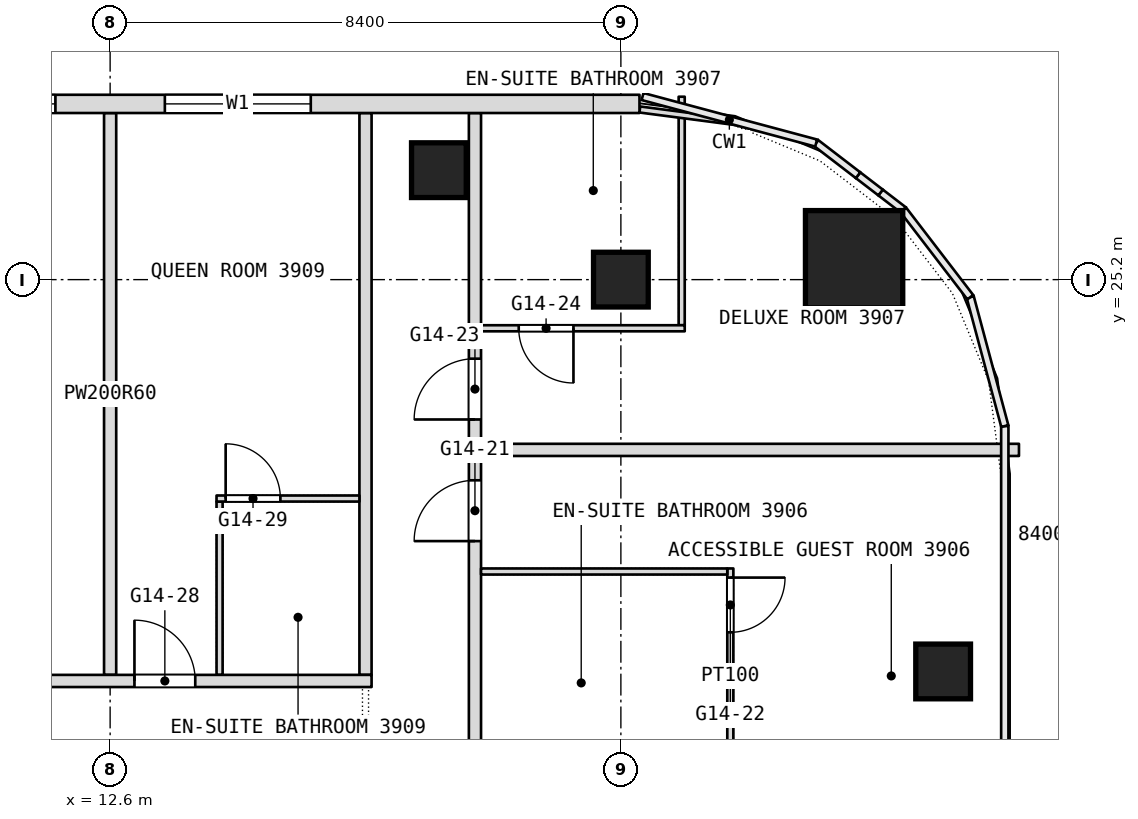
"""IFC4 building model, lengths in metres.
Left out: names, types, materials, properties, quantities, classifications, styles, units other than length and angle.
Written with IfcOpenShell. Run it as: python <this file> out.ifc"""

import sys

from ifc_helpers import new_model, si_unit, direction, frame, frame_2d, origin, origin_2d, place, context, subcontext, project, spatial, rectangle, extrude, element, fill, save


model = new_model("IFC4")
c1 = context("Model", 3, precision=1e-05, world=origin(), true_north=direction((0.0, 1.0)))
c2 = subcontext(c1, "Body", "Model", "MODEL_VIEW")
j1 = project(units=[si_unit("LENGTHUNIT", "METRE"), si_unit("PLANEANGLEUNIT", "RADIAN")], contexts=[c1])
p1 = place(None, origin())
s1 = spatial("IfcSite", under=j1, at=p1, CompositionType="ELEMENT")
p2 = place(p1, origin())
s2 = spatial("IfcBuilding", under=s1, at=p2, CompositionType="ELEMENT")
p3 = place(p2, frame((0.0, 0.0, 166.1)))
s3 = spatial("IfcBuildingStorey", under=s2, at=p3, CompositionType="ELEMENT", Elevation=166.1)
p4 = place(p3, frame((24.835, 25.535, 0.0), z_axis=(0.0, 0.0, 1.0), x_axis=(1.0, 0.0, 0.0)))
e1 = element("IfcColumn", 1, at=p4, inside=s3, PredefinedType="COLUMN", context=c2, shape_type="SweptSolid", body=[
    extrude(rectangle(XDim=1.6, YDim=1.6, at=origin_2d()), origin(), (0.0, 0.0, 1.0), 3.6),
])
for number, where, z_axis, x_axis in (
    (2, (21.0, 25.2, 0.0), (0.0, 0.0, 1.0), (1.0, 0.0, 0.0)),
    (3, (18.007, 27.0, 0.0), (0.0, 0.0, 1.0), (1.0, 0.0, 0.0)),
    (4, (26.3, 18.756, 0.0), (0.0, 0.0, 1.0), (1.0, 0.0, 0.0)),
):
    element("IfcColumn", number, at=place(p3, frame(where, z_axis=z_axis, x_axis=x_axis)), inside=s3, PredefinedType="COLUMN", context=c2, shape_type="SweptSolid", body=[
        extrude(rectangle(XDim=0.9, YDim=0.9, at=origin_2d()), origin(), (0.0, 0.0, 1.0), 3.6),
    ])
p5 = place(p3, frame((22.8, 16.9, 0.0), z_axis=(0.0, 0.0, 1.0), x_axis=(0.0, 1.0, 0.0)))
e5 = element("IfcWall", 5, at=p5, inside=s3, PredefinedType="PARTITIONING", context=c2, shape_type="SweptSolid", body=[
    extrude(rectangle(XDim=3.55, YDim=0.1, at=frame_2d((1.775, 0.0))), origin(), (0.0, 0.0, 1.0), 3.3),
])
p6 = place(p5, frame((2.5, 0.0, 0.0)))
e6 = element("IfcOpeningElement", 6, at=p6, cuts=e5, PredefinedType="OPENING", context=c2, shape_type="SweptSolid", body=[
    extrude(rectangle(XDim=0.9, YDim=2.1, at=frame_2d((0.45, 1.05))), frame((0.0, 0.05, 0.0), z_axis=(0.0, -1.0, 0.0), x_axis=(1.0, 0.0, 0.0)), (0.0, 0.0, 1.0), 0.1),
])
p7 = place(p3, frame((22.0, 24.45, 0.0), z_axis=(0.0, 0.0, 1.0), x_axis=(0.0, 1.0, 0.0)))
e7 = element("IfcWall", 7, at=p7, inside=s3, PredefinedType="PARTITIONING", context=c2, shape_type="SweptSolid", body=[
    extrude(rectangle(XDim=3.758, YDim=0.1, at=frame_2d((1.879, 0.0))), origin(), (0.0, 0.0, 1.0), 3.3),
])
p8 = place(p3, frame((18.6, -21.708, 0.0), z_axis=(0.0, 0.0, 1.0), x_axis=(0.0, 1.0, 0.0)))
e8 = element("IfcWall", 8, at=p8, inside=s3, PredefinedType="PARTITIONING", context=c2, shape_type="SweptSolid", body=[
    extrude(rectangle(XDim=49.648, YDim=0.2, at=frame_2d((24.824, 0.0))), origin(), (0.0, 0.0, 1.0), 3.3),
])
p9 = place(p8, frame((2.204, 0.0, 0.0)))
e9 = element("IfcOpeningElement", 9, at=p9, cuts=e8, PredefinedType="OPENING", context=c2, shape_type="SweptSolid", body=[
    extrude(rectangle(XDim=0.9, YDim=2.1, at=frame_2d((0.45, 1.05))), frame((0.0, 0.1, 0.0), z_axis=(0.0, -1.0, 0.0), x_axis=(1.0, 0.0, 0.0)), (0.0, 0.0, 1.0), 0.2),
])
p10 = place(p8, frame((8.608, 0.0, 0.0)))
e10 = element("IfcOpeningElement", 10, at=p10, cuts=e8, PredefinedType="OPENING", context=c2, shape_type="SweptSolid", body=[
    extrude(rectangle(XDim=1.1, YDim=2.1, at=frame_2d((0.55, 1.05))), frame((0.0, 0.1, 0.0), z_axis=(0.0, -1.0, 0.0), x_axis=(1.0, 0.0, 0.0)), (0.0, 0.0, 1.0), 0.2),
])
p11 = place(p8, frame((16.608, 0.0, 0.0)))
e11 = element("IfcOpeningElement", 11, at=p11, cuts=e8, PredefinedType="OPENING", context=c2, shape_type="SweptSolid", body=[
    extrude(rectangle(XDim=1.8, YDim=2.1, at=frame_2d((0.9, 1.05))), frame((0.0, 0.1, 0.0), z_axis=(0.0, -1.0, 0.0), x_axis=(1.0, 0.0, 0.0)), (0.0, 0.0, 1.0), 0.2),
])
p12 = place(p8, frame((27.458, 0.0, 0.0)))
e12 = element("IfcOpeningElement", 12, at=p12, cuts=e8, PredefinedType="OPENING", context=c2, shape_type="SweptSolid", body=[
    extrude(rectangle(XDim=1.1, YDim=2.1, at=frame_2d((0.55, 1.05))), frame((0.0, 0.1, 0.0), z_axis=(0.0, -1.0, 0.0), x_axis=(1.0, 0.0, 0.0)), (0.0, 0.0, 1.0), 0.2),
])
p13 = place(p8, frame((30.508, 0.0, 0.0)))
e13 = element("IfcOpeningElement", 13, at=p13, cuts=e8, PredefinedType="OPENING", context=c2, shape_type="SweptSolid", body=[
    extrude(rectangle(XDim=1.0, YDim=2.1, at=frame_2d((0.5, 1.05))), frame((0.0, 0.1, 0.0), z_axis=(0.0, -1.0, 0.0), x_axis=(1.0, 0.0, 0.0)), (0.0, 0.0, 1.0), 0.2),
])
p14 = place(p8, frame((37.108, 0.0, 0.0)))
e14 = element("IfcOpeningElement", 14, at=p14, cuts=e8, PredefinedType="OPENING", context=c2, shape_type="SweptSolid", body=[
    extrude(rectangle(XDim=1.0, YDim=2.1, at=frame_2d((0.5, 1.05))), frame((0.0, 0.1, 0.0), z_axis=(0.0, -1.0, 0.0), x_axis=(1.0, 0.0, 0.0)), (0.0, 0.0, 1.0), 0.2),
])
p15 = place(p8, frame((42.608, 0.0, 0.0)))
e15 = element("IfcOpeningElement", 15, at=p15, cuts=e8, PredefinedType="OPENING", context=c2, shape_type="SweptSolid", body=[
    extrude(rectangle(XDim=1.0, YDim=2.1, at=frame_2d((0.5, 1.05))), frame((0.0, 0.1, 0.0), z_axis=(0.0, -1.0, 0.0), x_axis=(1.0, 0.0, 0.0)), (0.0, 0.0, 1.0), 0.2),
])
p16 = place(p8, frame((44.608, 0.0, 0.0)))
e16 = element("IfcOpeningElement", 16, at=p16, cuts=e8, PredefinedType="OPENING", context=c2, shape_type="SweptSolid", body=[
    extrude(rectangle(XDim=1.0, YDim=2.1, at=frame_2d((0.5, 1.05))), frame((0.0, 0.1, 0.0), z_axis=(0.0, -1.0, 0.0), x_axis=(1.0, 0.0, 0.0)), (0.0, 0.0, 1.0), 0.2),
])
p17 = place(p3, frame((16.8, 18.7, 0.0), z_axis=(0.0, 0.0, 1.0), x_axis=(0.0, 1.0, 0.0)))
e17 = element("IfcWall", 17, at=p17, inside=s3, PredefinedType="PARTITIONING", context=c2, shape_type="SweptSolid", body=[
    extrude(rectangle(XDim=9.24, YDim=0.2, at=frame_2d((4.62, 0.0))), origin(), (0.0, 0.0, 1.0), 3.3),
])
p18 = place(p3, frame((14.4, 18.7, 0.0), z_axis=(0.0, 0.0, 1.0), x_axis=(0.0, 1.0, 0.0)))
e18 = element("IfcWall", 18, at=p18, inside=s3, PredefinedType="PARTITIONING", context=c2, shape_type="SweptSolid", body=[
    extrude(rectangle(XDim=2.85, YDim=0.1, at=frame_2d((1.425, 0.0))), origin(), (0.0, 0.0, 1.0), 3.3),
])
p19 = place(p3, frame((12.6, 18.7, 0.0), z_axis=(0.0, 0.0, 1.0), x_axis=(0.0, 1.0, 0.0)))
e19 = element("IfcWall", 19, at=p19, inside=s3, PredefinedType="PARTITIONING", context=c2, shape_type="SweptSolid", body=[
    extrude(rectangle(XDim=9.24, YDim=0.2, at=frame_2d((4.62, 0.0))), origin(), (0.0, 0.0, 1.0), 3.3),
])
p20 = place(p3, frame((10.7, 18.6, 0.0), z_axis=(0.0, 0.0, 1.0), x_axis=(1.0, 0.0, 0.0)))
e20 = element("IfcWall", 20, at=p20, inside=s3, PredefinedType="PARTITIONING", context=c2, shape_type="SweptSolid", body=[
    extrude(rectangle(XDim=6.2, YDim=0.2, at=frame_2d((3.1, 0.0))), origin(), (0.0, 0.0, 1.0), 3.3),
])
p21 = place(p20, frame((2.3, 0.0, 0.0)))
e21 = element("IfcOpeningElement", 21, at=p21, cuts=e20, PredefinedType="OPENING", context=c2, shape_type="SweptSolid", body=[
    extrude(rectangle(XDim=1.0, YDim=2.1, at=frame_2d((0.5, 1.05))), frame((0.0, 0.1, 0.0), z_axis=(0.0, -1.0, 0.0), x_axis=(1.0, 0.0, 0.0)), (0.0, 0.0, 1.0), 0.2),
])
p22 = place(p3, frame((18.7, 20.4, 0.0), z_axis=(0.0, 0.0, 1.0), x_axis=(1.0, 0.0, 0.0)))
e22 = element("IfcWall", 22, at=p22, inside=s3, PredefinedType="PARTITIONING", context=c2, shape_type="SweptSolid", body=[
    extrude(rectangle(XDim=4.05, YDim=0.1, at=frame_2d((2.025, 0.0))), origin(), (0.0, 0.0, 1.0), 3.3),
])
p23 = place(p3, frame((14.35, 21.6, 0.0), z_axis=(0.0, 0.0, 1.0), x_axis=(1.0, 0.0, 0.0)))
e23 = element("IfcWall", 23, at=p23, inside=s3, PredefinedType="PARTITIONING", context=c2, shape_type="SweptSolid", body=[
    extrude(rectangle(XDim=2.35, YDim=0.1, at=frame_2d((1.175, 0.0))), origin(), (0.0, 0.0, 1.0), 3.3),
])
p24 = place(p23, frame((0.15, 0.0, 0.0)))
e24 = element("IfcOpeningElement", 24, at=p24, cuts=e23, PredefinedType="OPENING", context=c2, shape_type="SweptSolid", body=[
    extrude(rectangle(XDim=0.9, YDim=2.1, at=frame_2d((0.45, 1.05))), frame((0.0, 0.05, 0.0), z_axis=(0.0, -1.0, 0.0), x_axis=(1.0, 0.0, 0.0)), (0.0, 0.0, 1.0), 0.1),
])
p25 = place(p3, frame((18.7, 22.4, 0.0), z_axis=(0.0, 0.0, 1.0), x_axis=(1.0, 0.0, 0.0)))
e25 = element("IfcWall", 25, at=p25, inside=s3, PredefinedType="PARTITIONING", context=c2, shape_type="SweptSolid", body=[
    extrude(rectangle(XDim=8.847, YDim=0.2, at=frame_2d((4.424, 0.0))), origin(), (0.0, 0.0, 1.0), 3.3),
])
p26 = place(p3, frame((18.7, 24.4, 0.0), z_axis=(0.0, 0.0, 1.0), x_axis=(1.0, 0.0, 0.0)))
e26 = element("IfcWall", 26, at=p26, inside=s3, PredefinedType="PARTITIONING", context=c2, shape_type="SweptSolid", body=[
    extrude(rectangle(XDim=3.35, YDim=0.1, at=frame_2d((1.675, 0.0))), origin(), (0.0, 0.0, 1.0), 3.3),
])
p27 = place(p26, frame((0.62, 0.0, 0.0)))
e27 = element("IfcOpeningElement", 27, at=p27, cuts=e26, PredefinedType="OPENING", context=c2, shape_type="SweptSolid", body=[
    extrude(rectangle(XDim=0.9, YDim=2.1, at=frame_2d((0.45, 1.05))), frame((0.0, 0.05, 0.0), z_axis=(0.0, -1.0, 0.0), x_axis=(1.0, 0.0, 0.0)), (0.0, 0.0, 1.0), 0.1),
])
p28 = place(p3, frame((21.312, 27.998, 0.0), z_axis=(0.0, 0.0, 1.0), x_axis=(0.991547575144, -0.129743617284, 0.0)))
e28 = element("IfcWall", 28, at=p28, inside=s3, PredefinedType="PARTITIONING", context=c2, shape_type="SweptSolid", body=[
    extrude(rectangle(XDim=1.626, YDim=0.1, at=frame_2d((0.813, 0.0))), origin(), (0.0, 0.0, 1.0), 3.3),
])
p29 = place(p3, frame((21.306, 28.09, 0.0), z_axis=(0.0, 0.0, 1.0), x_axis=(-1.0, 0.0, 0.0)))
e29 = element("IfcWall", 29, at=p29, inside=s3, PredefinedType="NOTDEFINED", context=c2, shape_type="SweptSolid", body=[
    extrude(rectangle(XDim=42.612, YDim=0.3, at=frame_2d((21.306, 0.0))), origin(), (0.0, 0.0, 1.0), 3.6),
])
p30 = place(p29, frame((5.406, 0.0, 0.9)))
e30 = element("IfcOpeningElement", 30, at=p30, cuts=e29, PredefinedType="OPENING", context=c2, shape_type="SweptSolid", body=[
    extrude(rectangle(XDim=2.4, YDim=2.1, at=frame_2d((1.2, 1.05))), frame((0.0, 0.15, 0.0), z_axis=(0.0, -1.0, 0.0), x_axis=(1.0, 0.0, 0.0)), (0.0, 0.0, 1.0), 0.3),
])
p31 = place(p29, frame((9.606, 0.0, 0.9)))
e31 = element("IfcOpeningElement", 31, at=p31, cuts=e29, PredefinedType="OPENING", context=c2, shape_type="SweptSolid", body=[
    extrude(rectangle(XDim=2.4, YDim=2.1, at=frame_2d((1.2, 1.05))), frame((0.0, 0.15, 0.0), z_axis=(0.0, -1.0, 0.0), x_axis=(1.0, 0.0, 0.0)), (0.0, 0.0, 1.0), 0.3),
])
p32 = place(p29, frame((13.806, 0.0, 0.9)))
e32 = element("IfcOpeningElement", 32, at=p32, cuts=e29, PredefinedType="OPENING", context=c2, shape_type="SweptSolid", body=[
    extrude(rectangle(XDim=2.4, YDim=2.1, at=frame_2d((1.2, 1.05))), frame((0.0, 0.15, 0.0), z_axis=(0.0, -1.0, 0.0), x_axis=(1.0, 0.0, 0.0)), (0.0, 0.0, 1.0), 0.3),
])
p33 = place(p29, frame((18.006, 0.0, 0.9)))
e33 = element("IfcOpeningElement", 33, at=p33, cuts=e29, PredefinedType="OPENING", context=c2, shape_type="SweptSolid", body=[
    extrude(rectangle(XDim=2.4, YDim=2.1, at=frame_2d((1.2, 1.05))), frame((0.0, 0.15, 0.0), z_axis=(0.0, -1.0, 0.0), x_axis=(1.0, 0.0, 0.0)), (0.0, 0.0, 1.0), 0.3),
])
p34 = place(p29, frame((22.206, 0.0, 0.9)))
e34 = element("IfcOpeningElement", 34, at=p34, cuts=e29, PredefinedType="OPENING", context=c2, shape_type="SweptSolid", body=[
    extrude(rectangle(XDim=2.4, YDim=2.1, at=frame_2d((1.2, 1.05))), frame((0.0, 0.15, 0.0), z_axis=(0.0, -1.0, 0.0), x_axis=(1.0, 0.0, 0.0)), (0.0, 0.0, 1.0), 0.3),
])
p35 = place(p29, frame((26.406, 0.0, 0.9)))
e35 = element("IfcOpeningElement", 35, at=p35, cuts=e29, PredefinedType="OPENING", context=c2, shape_type="SweptSolid", body=[
    extrude(rectangle(XDim=2.4, YDim=2.1, at=frame_2d((1.2, 1.05))), frame((0.0, 0.15, 0.0), z_axis=(0.0, -1.0, 0.0), x_axis=(1.0, 0.0, 0.0)), (0.0, 0.0, 1.0), 0.3),
])
p36 = place(p29, frame((30.606, 0.0, 0.9)))
e36 = element("IfcOpeningElement", 36, at=p36, cuts=e29, PredefinedType="OPENING", context=c2, shape_type="SweptSolid", body=[
    extrude(rectangle(XDim=2.4, YDim=2.1, at=frame_2d((1.2, 1.05))), frame((0.0, 0.15, 0.0), z_axis=(0.0, -1.0, 0.0), x_axis=(1.0, 0.0, 0.0)), (0.0, 0.0, 1.0), 0.3),
])
p37 = place(p29, frame((34.806, 0.0, 0.9)))
e37 = element("IfcOpeningElement", 37, at=p37, cuts=e29, PredefinedType="OPENING", context=c2, shape_type="SweptSolid", body=[
    extrude(rectangle(XDim=2.4, YDim=2.1, at=frame_2d((1.2, 1.05))), frame((0.0, 0.15, 0.0), z_axis=(0.0, -1.0, 0.0), x_axis=(1.0, 0.0, 0.0)), (0.0, 0.0, 1.0), 0.3),
])
p38 = place(p6, origin())
e38 = element("IfcDoor", 38, at=p38, inside=s3, OperationType="SINGLE_SWING_RIGHT", PredefinedType="DOOR", context=c2, shape_type="SweptSolid", body=[
    extrude(rectangle(XDim=0.9, YDim=2.1, at=frame_2d((0.45, 1.05))), frame((0.0, 0.025, 0.0), z_axis=(0.0, -1.0, 0.0), x_axis=(1.0, 0.0, 0.0)), (0.0, 0.0, 1.0), 0.05),
])
fill(e6, e38)
p39 = place(p15, origin())
e39 = element("IfcDoor", 39, at=p39, inside=s3, OperationType="SINGLE_SWING_LEFT", PredefinedType="DOOR", context=c2, shape_type="SweptSolid", body=[
    extrude(rectangle(XDim=1.0, YDim=2.1, at=frame_2d((0.5, 1.05))), frame((0.0, 0.025, 0.0), z_axis=(0.0, -1.0, 0.0), x_axis=(1.0, 0.0, 0.0)), (0.0, 0.0, 1.0), 0.05),
])
fill(e15, e39)
p40 = place(p16, origin())
e40 = element("IfcDoor", 40, at=p40, inside=s3, OperationType="SINGLE_SWING_LEFT", PredefinedType="DOOR", context=c2, shape_type="SweptSolid", body=[
    extrude(rectangle(XDim=1.0, YDim=2.1, at=frame_2d((0.5, 1.05))), frame((0.0, 0.025, 0.0), z_axis=(0.0, -1.0, 0.0), x_axis=(1.0, 0.0, 0.0)), (0.0, 0.0, 1.0), 0.05),
])
fill(e16, e40)
p41 = place(p21, origin())
e41 = element("IfcDoor", 41, at=p41, inside=s3, OperationType="SINGLE_SWING_LEFT", PredefinedType="DOOR", context=c2, shape_type="SweptSolid", body=[
    extrude(rectangle(XDim=1.0, YDim=2.1, at=frame_2d((0.5, 1.05))), frame((0.0, 0.025, 0.0), z_axis=(0.0, -1.0, 0.0), x_axis=(1.0, 0.0, 0.0)), (0.0, 0.0, 1.0), 0.05),
])
fill(e21, e41)
p42 = place(p24, origin())
e42 = element("IfcDoor", 42, at=p42, inside=s3, OperationType="SINGLE_SWING_RIGHT", PredefinedType="DOOR", context=c2, shape_type="SweptSolid", body=[
    extrude(rectangle(XDim=0.9, YDim=2.1, at=frame_2d((0.45, 1.05))), frame((0.0, 0.025, 0.0), z_axis=(0.0, -1.0, 0.0), x_axis=(1.0, 0.0, 0.0)), (0.0, 0.0, 1.0), 0.05),
])
fill(e24, e42)
p43 = place(p27, origin())
e43 = element("IfcDoor", 43, at=p43, inside=s3, OperationType="SINGLE_SWING_RIGHT", PredefinedType="DOOR", context=c2, shape_type="SweptSolid", body=[
    extrude(rectangle(XDim=0.9, YDim=2.1, at=frame_2d((0.45, 1.05))), frame((0.0, 0.025, 0.0), z_axis=(0.0, -1.0, 0.0), x_axis=(1.0, 0.0, 0.0)), (0.0, 0.0, 1.0), 0.05),
])
fill(e27, e43)
p44 = place(p30, origin())
e44 = element("IfcWindow", 44, at=p44, inside=s3, PartitioningType="SINGLE_PANEL", PredefinedType="WINDOW", context=c2, shape_type="SweptSolid", body=[
    extrude(rectangle(XDim=2.4, YDim=2.1, at=frame_2d((1.2, 1.05))), frame((0.0, 0.03, 0.0), z_axis=(0.0, -1.0, 0.0), x_axis=(1.0, 0.0, 0.0)), (0.0, 0.0, 1.0), 0.06),
])
fill(e30, e44)
p45 = place(p31, origin())
e45 = element("IfcWindow", 45, at=p45, inside=s3, PartitioningType="SINGLE_PANEL", PredefinedType="WINDOW", context=c2, shape_type="SweptSolid", body=[
    extrude(rectangle(XDim=2.4, YDim=2.1, at=frame_2d((1.2, 1.05))), frame((0.0, 0.03, 0.0), z_axis=(0.0, -1.0, 0.0), x_axis=(1.0, 0.0, 0.0)), (0.0, 0.0, 1.0), 0.06),
])
fill(e31, e45)
save(model, sys.argv[1])
